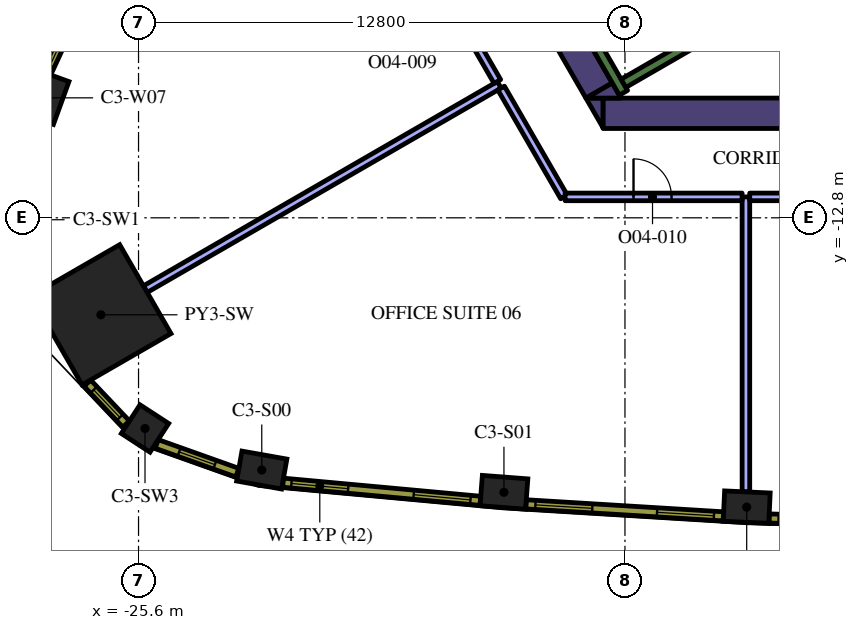
"""IFC4 building model, lengths in metres.
Left out: names, types, materials, properties, quantities, classifications, styles, units other than length and angle.
Written with IfcOpenShell. Run it as: python <this file> out.ifc"""

import sys

from ifc_helpers import new_model, si_unit, direction, frame, frame_2d, origin, origin_2d, place, context, subcontext, project, spatial, polyline, rectangle, outline, extrude, element, fill, save


model = new_model("IFC4")
c1 = context("Model", 3, precision=1e-05, world=origin(), true_north=direction((0.0, 1.0)))
c2 = subcontext(c1, "Body", "Model", "MODEL_VIEW")
j1 = project(units=[si_unit("LENGTHUNIT", "METRE"), si_unit("PLANEANGLEUNIT", "RADIAN")], contexts=[c1])
p1 = place(None, origin())
s1 = spatial("IfcSite", under=j1, at=p1, CompositionType="ELEMENT")
p2 = place(p1, origin())
s2 = spatial("IfcBuilding", under=s1, at=p2, CompositionType="ELEMENT")
p3 = place(p2, frame((0.0, 0.0, 187.8)))
s3 = spatial("IfcBuildingStorey", under=s2, at=p3, CompositionType="ELEMENT", Elevation=187.8)
p4 = place(p3, frame((-26.591, -15.352, 0.0), z_axis=(0.0, 0.0, 1.0), x_axis=(-0.866025403784, -0.5, 0.0)))
e1 = element("IfcColumn", 1, at=p4, inside=s3, PredefinedType="COLUMN", context=c2, shape_type="SweptSolid", body=[
    extrude(rectangle(XDim=2.7, YDim=2.7, at=origin_2d()), origin(), (0.0, 0.0, 1.0), 4.2),
])
for number, where, z_axis, x_axis in (
    (2, (-22.357, -19.437, 0.0), (0.0, 0.0, 1.0), (0.985, -0.175, 0.0)),
    (3, (-15.985, -20.022, 0.0), (0.0, 0.0, 1.0), (0.997, -0.076, 0.0)),
    (4, (-9.597, -20.413, 0.0), (0.0, 0.0, 1.0), (0.999, -0.046, 0.0)),
    (5, (-28.012, -9.644, 0.0), (0.0, 0.0, 1.0), (-0.341, -0.94, 0.0)),
):
    element("IfcColumn", number, at=place(p3, frame(where, z_axis=z_axis, x_axis=x_axis)), inside=s3, PredefinedType="COLUMN", context=c2, shape_type="SweptSolid", body=[
        extrude(rectangle(XDim=1.2, YDim=0.8, at=origin_2d()), origin(), (0.0, 0.0, 1.0), 4.2),
    ])
p5 = place(p3, frame((-25.43, -18.344, 0.0), z_axis=(0.0, 0.0, 1.0), x_axis=(0.838094050847, -0.545525766518, 0.0)))
e6 = element("IfcColumn", 6, at=p5, inside=s3, PredefinedType="COLUMN", context=c2, shape_type="SweptSolid", body=[
    extrude(rectangle(XDim=0.9, YDim=0.9, at=origin_2d()), origin(), (0.0, 0.0, 1.0), 4.2),
])
p6 = place(p3, frame((-13.378, -10.05, 0.0), z_axis=(0.0, 0.0, 1.0), x_axis=(1.0, 0.0, 0.0)))
e7 = element("IfcWall", 7, at=p6, inside=s3, PredefinedType="SOLIDWALL", context=c2, shape_type="SweptSolid", body=[
    extrude(rectangle(XDim=22.282, YDim=0.8, at=frame_2d((11.141, 0.0))), origin(), (0.0, 0.0, 1.0), 4.2),
])
p7 = place(p3, origin())
e8 = element("IfcWall", 8, at=p7, inside=s3, PredefinedType="SOLIDWALL", context=c2, shape_type="SweptSolid", body=[
    extrude(outline(polyline([(-13.828, -9.65), (-13.38, -9.65), (-13.38, -10.426), (-13.828, -9.65)])), origin(), (0.0, 0.0, 1.0), 4.2),
])
p8 = place(p3, frame((-15.392, -6.14, 0.0), z_axis=(0.0, 0.0, 1.0), x_axis=(0.499984020225, -0.866034629516, 0.0)))
e9 = element("IfcWall", 9, at=p8, inside=s3, PredefinedType="SOLIDWALL", context=c2, shape_type="SweptSolid", body=[
    extrude(rectangle(XDim=3.824, YDim=0.8, at=frame_2d((1.912, 0.0))), origin(), (0.0, 0.0, 1.0), 4.2),
])
e10 = element("IfcWall", 10, at=p7, inside=s3, PredefinedType="SOLIDWALL", context=c2, shape_type="SweptSolid", body=[
    extrude(outline(polyline([(-12.904, -9.65), (-13.82, -9.65), (-13.133, -9.253), (-12.904, -9.65)])), origin(), (0.0, 0.0, 1.0), 4.2),
])
p9 = place(p3, frame((-12.84, -9.511, 0.0), z_axis=(0.0, 0.0, 1.0), x_axis=(-0.499997733992, 0.866026712061, 0.0)))
e11 = element("IfcWall", 11, at=p9, inside=s3, PredefinedType="SOLIDWALL", context=c2, shape_type="SweptSolid", body=[
    extrude(rectangle(XDim=3.634, YDim=0.25, at=frame_2d((1.817, 0.0))), origin(), (0.0, 0.0, 1.0), 4.2),
])
p10 = place(p3, frame((-12.84, -9.261, 0.0), z_axis=(0.0, 0.0, 1.0), x_axis=(0.866016039709, 0.500016218704, 0.0)))
e12 = element("IfcWall", 12, at=p10, inside=s3, PredefinedType="SOLIDWALL", context=c2, shape_type="SweptSolid", body=[
    extrude(rectangle(XDim=7.05, YDim=0.25, at=frame_2d((3.525, 0.0))), origin(), (0.0, 0.0, 1.0), 4.2),
])
p11 = place(p3, frame((-9.617, -20.011, 0.0), z_axis=(0.0, 0.0, 1.0), x_axis=(0.0, 1.0, 0.0)))
e13 = element("IfcWall", 13, at=p11, inside=s3, PredefinedType="PARTITIONING", context=c2, shape_type="SweptSolid", body=[
    extrude(rectangle(XDim=7.761, YDim=0.2, at=frame_2d((3.881, 0.0))), origin(), (0.0, 0.0, 1.0), 3.15),
])
p12 = place(p3, frame((-9.517, -12.25, 0.0), z_axis=(0.0, 0.0, 1.0), x_axis=(1.0, 0.0, 0.0)))
e14 = element("IfcWall", 14, at=p12, inside=s3, PredefinedType="PARTITIONING", context=c2, shape_type="SweptSolid", body=[
    extrude(rectangle(XDim=5.987, YDim=0.2, at=frame_2d((2.994, 0.0))), origin(), (0.0, 0.0, 1.0), 3.15),
])
p13 = place(p3, frame((-16.108, -9.3, 0.0), z_axis=(0.0, 0.0, 1.0), x_axis=(-0.866027180319, -0.499996922939, 0.0)))
e15 = element("IfcWall", 15, at=p13, inside=s3, PredefinedType="PARTITIONING", context=c2, shape_type="SweptSolid", body=[
    extrude(rectangle(XDim=10.754, YDim=0.2, at=frame_2d((5.377, 0.0))), origin(), (0.0, 0.0, 1.0), 3.15),
])
p14 = place(p3, frame((-17.796, -6.376, 0.0), z_axis=(0.0, 0.0, 1.0), x_axis=(0.500001965626, -0.866024268927, 0.0)))
e16 = element("IfcWall", 16, at=p14, inside=s3, PredefinedType="PARTITIONING", context=c2, shape_type="SweptSolid", body=[
    extrude(rectangle(XDim=3.276, YDim=0.2, at=frame_2d((1.638, 0.0))), origin(), (0.0, 0.0, 1.0), 3.15),
])
p15 = place(p14, frame((1.1, 0.0, 0.0)))
e17 = element("IfcOpeningElement", 17, at=p15, cuts=e16, PredefinedType="OPENING", context=c2, shape_type="SweptSolid", body=[
    extrude(rectangle(XDim=1.0, YDim=2.1, at=frame_2d((0.5, 1.05))), frame((0.0, 0.11, 0.0), z_axis=(0.0, -1.0, 0.0), x_axis=(1.0, 0.0, 0.0)), (0.0, 0.0, 1.0), 0.22),
])
p16 = place(p3, frame((-16.058, -9.387, 0.0), z_axis=(0.0, 0.0, 1.0), x_axis=(0.500046299512, -0.865998671098, 0.0)))
e18 = element("IfcWall", 18, at=p16, inside=s3, PredefinedType="PARTITIONING", context=c2, shape_type="SweptSolid", body=[
    extrude(rectangle(XDim=3.306, YDim=0.2, at=frame_2d((1.653, 0.0))), origin(), (0.0, 0.0, 1.0), 3.15),
])
p17 = place(p3, frame((-14.375, -12.25, 0.0), z_axis=(0.0, 0.0, 1.0), x_axis=(1.0, 0.0, 0.0)))
e19 = element("IfcWall", 19, at=p17, inside=s3, PredefinedType="PARTITIONING", context=c2, shape_type="SweptSolid", body=[
    extrude(rectangle(XDim=4.658, YDim=0.2, at=frame_2d((2.329, 0.0))), origin(), (0.0, 0.0, 1.0), 3.15),
])
p18 = place(p17, frame((1.8, 0.0, 0.0)))
e20 = element("IfcOpeningElement", 20, at=p18, cuts=e19, PredefinedType="OPENING", context=c2, shape_type="SweptSolid", body=[
    extrude(rectangle(XDim=1.0, YDim=2.1, at=frame_2d((0.5, 1.05))), frame((0.0, 0.11, 0.0), z_axis=(0.0, -1.0, 0.0), x_axis=(1.0, 0.0, 0.0)), (0.0, 0.0, 1.0), 0.22),
])
p19 = place(p3, frame((-21.797, -19.77, 0.0), z_axis=(0.0, 0.0, 1.0), x_axis=(0.995808712151, -0.091460422067, 0.0)))
e21 = element("IfcWall", 21, at=p19, inside=s3, PredefinedType="SOLIDWALL", context=c2, shape_type="SweptSolid", body=[
    extrude(rectangle(XDim=5.213, YDim=0.24, at=frame_2d((2.606, 0.0))), origin(), (0.0, 0.0, 1.0), 3.95),
])
p20 = place(p19, frame((0.221, 0.0, 0.9)))
e22 = element("IfcOpeningElement", 22, at=p20, cuts=e21, PredefinedType="OPENING", context=c2, shape_type="SweptSolid", body=[
    extrude(rectangle(XDim=1.5, YDim=2.55, at=frame_2d((0.75, 1.275))), frame((0.0, 0.13, 0.0), z_axis=(0.0, -1.0, 0.0), x_axis=(1.0, 0.0, 0.0)), (0.0, 0.0, 1.0), 0.26),
])
p21 = place(p19, frame((3.452, 0.0, 0.9)))
e23 = element("IfcOpeningElement", 23, at=p21, cuts=e21, PredefinedType="OPENING", context=c2, shape_type="SweptSolid", body=[
    extrude(rectangle(XDim=1.5, YDim=2.55, at=frame_2d((0.75, 1.275))), frame((0.0, 0.13, 0.0), z_axis=(0.0, -1.0, 0.0), x_axis=(1.0, 0.0, 0.0)), (0.0, 0.0, 1.0), 0.26),
])
p22 = place(p3, frame((-15.405, -20.338, 0.0), z_axis=(0.0, 0.0, 1.0), x_axis=(0.998135294646, -0.061040425794, 0.0)))
e24 = element("IfcWall", 24, at=p22, inside=s3, PredefinedType="SOLIDWALL", context=c2, shape_type="SweptSolid", body=[
    extrude(rectangle(XDim=5.204, YDim=0.24, at=frame_2d((2.602, 0.0))), origin(), (0.0, 0.0, 1.0), 3.95),
])
p23 = place(p22, frame((0.248, 0.0, 0.9)))
e25 = element("IfcOpeningElement", 25, at=p23, cuts=e24, PredefinedType="OPENING", context=c2, shape_type="SweptSolid", body=[
    extrude(rectangle(XDim=1.5, YDim=2.55, at=frame_2d((0.75, 1.275))), frame((0.0, 0.13, 0.0), z_axis=(0.0, -1.0, 0.0), x_axis=(1.0, 0.0, 0.0)), (0.0, 0.0, 1.0), 0.26),
])
p24 = place(p22, frame((3.455, 0.0, 0.9)))
e26 = element("IfcOpeningElement", 26, at=p24, cuts=e24, PredefinedType="OPENING", context=c2, shape_type="SweptSolid", body=[
    extrude(rectangle(XDim=1.5, YDim=2.55, at=frame_2d((0.75, 1.275))), frame((0.0, 0.13, 0.0), z_axis=(0.0, -1.0, 0.0), x_axis=(1.0, 0.0, 0.0)), (0.0, 0.0, 1.0), 0.26),
])
p25 = place(p3, frame((-9.007, -20.711, 0.0), z_axis=(0.0, 0.0, 1.0), x_axis=(0.999533441983, -0.030543384845, 0.0)))
e27 = element("IfcWall", 27, at=p25, inside=s3, PredefinedType="SOLIDWALL", context=c2, shape_type="SweptSolid", body=[
    extrude(rectangle(XDim=5.204, YDim=0.24, at=frame_2d((2.602, 0.0))), origin(), (0.0, 0.0, 1.0), 3.95),
])
p26 = place(p25, frame((0.248, 0.0, 0.9)))
e28 = element("IfcOpeningElement", 28, at=p26, cuts=e27, PredefinedType="OPENING", context=c2, shape_type="SweptSolid", body=[
    extrude(rectangle(XDim=1.5, YDim=2.55, at=frame_2d((0.75, 1.275))), frame((0.0, 0.13, 0.0), z_axis=(0.0, -1.0, 0.0), x_axis=(1.0, 0.0, 0.0)), (0.0, 0.0, 1.0), 0.26),
])
p27 = place(p25, frame((3.455, 0.0, 0.9)))
e29 = element("IfcOpeningElement", 29, at=p27, cuts=e27, PredefinedType="OPENING", context=c2, shape_type="SweptSolid", body=[
    extrude(rectangle(XDim=1.5, YDim=2.55, at=frame_2d((0.75, 1.275))), frame((0.0, 0.13, 0.0), z_axis=(0.0, -1.0, 0.0), x_axis=(1.0, 0.0, 0.0)), (0.0, 0.0, 1.0), 0.26),
])
p28 = place(p3, frame((-25.837, -4.258, 0.0), z_axis=(0.0, 0.0, 1.0), x_axis=(-0.418722559465, -0.908114209885, 0.0)))
e30 = element("IfcWall", 30, at=p28, inside=s3, PredefinedType="SOLIDWALL", context=c2, shape_type="SweptSolid", body=[
    extrude(rectangle(XDim=5.213, YDim=0.24, at=frame_2d((2.606, 0.0))), origin(), (0.0, 0.0, 1.0), 3.95),
])
p29 = place(p28, frame((0.261, 0.0, 0.9)))
e31 = element("IfcOpeningElement", 31, at=p29, cuts=e30, PredefinedType="OPENING", context=c2, shape_type="SweptSolid", body=[
    extrude(rectangle(XDim=1.5, YDim=2.55, at=frame_2d((0.75, 1.275))), frame((0.0, 0.13, 0.0), z_axis=(0.0, -1.0, 0.0), x_axis=(1.0, 0.0, 0.0)), (0.0, 0.0, 1.0), 0.26),
])
p30 = place(p28, frame((3.492, 0.0, 0.9)))
e32 = element("IfcOpeningElement", 32, at=p30, cuts=e30, PredefinedType="OPENING", context=c2, shape_type="SweptSolid", body=[
    extrude(rectangle(XDim=1.5, YDim=2.55, at=frame_2d((0.75, 1.275))), frame((0.0, 0.13, 0.0), z_axis=(0.0, -1.0, 0.0), x_axis=(1.0, 0.0, 0.0)), (0.0, 0.0, 1.0), 0.26),
])
p31 = place(p3, frame((-26.946, -17.151, 0.0), z_axis=(0.0, 0.0, 1.0), x_axis=(0.687986858937, -0.725723144133, 0.0)))
e33 = element("IfcWall", 33, at=p31, inside=s3, PredefinedType="SOLIDWALL", context=c2, shape_type="SweptSolid", body=[
    extrude(rectangle(XDim=1.481, YDim=0.24, at=frame_2d((0.741, 0.0))), origin(), (0.0, 0.0, 1.0), 3.95),
])
p32 = place(p31, frame((0.241, 0.0, 0.9)))
e34 = element("IfcOpeningElement", 34, at=p32, cuts=e33, PredefinedType="OPENING", context=c2, shape_type="SweptSolid", body=[
    extrude(rectangle(XDim=1.0, YDim=2.55, at=frame_2d((0.5, 1.275))), frame((0.0, 0.13, 0.0), z_axis=(0.0, -1.0, 0.0), x_axis=(1.0, 0.0, 0.0)), (0.0, 0.0, 1.0), 0.26),
])
p33 = place(p3, frame((-25.121, -18.751, 0.0), z_axis=(0.0, 0.0, 1.0), x_axis=(0.942099727267, -0.335332825539, 0.0)))
e35 = element("IfcWall", 35, at=p33, inside=s3, PredefinedType="SOLIDWALL", context=c2, shape_type="SweptSolid", body=[
    extrude(rectangle(XDim=2.25, YDim=0.24, at=frame_2d((1.125, 0.0))), origin(), (0.0, 0.0, 1.0), 3.95),
])
p34 = place(p33, frame((0.625, 0.0, 0.9)))
e36 = element("IfcOpeningElement", 36, at=p34, cuts=e35, PredefinedType="OPENING", context=c2, shape_type="SweptSolid", body=[
    extrude(rectangle(XDim=1.0, YDim=2.55, at=frame_2d((0.5, 1.275))), frame((0.0, 0.13, 0.0), z_axis=(0.0, -1.0, 0.0), x_axis=(1.0, 0.0, 0.0)), (0.0, 0.0, 1.0), 0.26),
])
p35 = place(p18, origin())
e37 = element("IfcDoor", 37, at=p35, inside=s3, OperationType="SINGLE_SWING_LEFT", PredefinedType="DOOR", context=c2, shape_type="SweptSolid", body=[
    extrude(rectangle(XDim=1.0, YDim=2.1, at=frame_2d((0.5, 1.05))), frame((0.0, 0.025, 0.0), z_axis=(0.0, -1.0, 0.0), x_axis=(1.0, 0.0, 0.0)), (0.0, 0.0, 1.0), 0.05),
])
fill(e20, e37)
p36 = place(p20, origin())
e38 = element("IfcWindow", 38, at=p36, inside=s3, PartitioningType="SINGLE_PANEL", PredefinedType="WINDOW", context=c2, shape_type="SweptSolid", body=[
    extrude(rectangle(XDim=1.5, YDim=2.55, at=frame_2d((0.75, 1.275))), frame((0.0, 0.04, 0.0), z_axis=(0.0, -1.0, 0.0), x_axis=(1.0, 0.0, 0.0)), (0.0, 0.0, 1.0), 0.06),
])
fill(e22, e38)
p37 = place(p21, origin())
e39 = element("IfcWindow", 39, at=p37, inside=s3, PartitioningType="SINGLE_PANEL", PredefinedType="WINDOW", context=c2, shape_type="SweptSolid", body=[
    extrude(rectangle(XDim=1.5, YDim=2.55, at=frame_2d((0.75, 1.275))), frame((0.0, 0.04, 0.0), z_axis=(0.0, -1.0, 0.0), x_axis=(1.0, 0.0, 0.0)), (0.0, 0.0, 1.0), 0.06),
])
fill(e23, e39)
p38 = place(p23, origin())
e40 = element("IfcWindow", 40, at=p38, inside=s3, PartitioningType="SINGLE_PANEL", PredefinedType="WINDOW", context=c2, shape_type="SweptSolid", body=[
    extrude(rectangle(XDim=1.5, YDim=2.55, at=frame_2d((0.75, 1.275))), frame((0.0, 0.04, 0.0), z_axis=(0.0, -1.0, 0.0), x_axis=(1.0, 0.0, 0.0)), (0.0, 0.0, 1.0), 0.06),
])
fill(e25, e40)
p39 = place(p24, origin())
e41 = element("IfcWindow", 41, at=p39, inside=s3, PartitioningType="SINGLE_PANEL", PredefinedType="WINDOW", context=c2, shape_type="SweptSolid", body=[
    extrude(rectangle(XDim=1.5, YDim=2.55, at=frame_2d((0.75, 1.275))), frame((0.0, 0.04, 0.0), z_axis=(0.0, -1.0, 0.0), x_axis=(1.0, 0.0, 0.0)), (0.0, 0.0, 1.0), 0.06),
])
fill(e26, e41)
p40 = place(p26, origin())
e42 = element("IfcWindow", 42, at=p40, inside=s3, PartitioningType="SINGLE_PANEL", PredefinedType="WINDOW", context=c2, shape_type="SweptSolid", body=[
    extrude(rectangle(XDim=1.5, YDim=2.55, at=frame_2d((0.75, 1.275))), frame((0.0, 0.04, 0.0), z_axis=(0.0, -1.0, 0.0), x_axis=(1.0, 0.0, 0.0)), (0.0, 0.0, 1.0), 0.06),
])
fill(e28, e42)
p41 = place(p30, origin())
e43 = element("IfcWindow", 43, at=p41, inside=s3, PartitioningType="SINGLE_PANEL", PredefinedType="WINDOW", context=c2, shape_type="SweptSolid", body=[
    extrude(rectangle(XDim=1.5, YDim=2.55, at=frame_2d((0.75, 1.275))), frame((0.0, 0.04, 0.0), z_axis=(0.0, -1.0, 0.0), x_axis=(1.0, 0.0, 0.0)), (0.0, 0.0, 1.0), 0.06),
])
fill(e32, e43)
p42 = place(p32, origin())
e44 = element("IfcWindow", 44, at=p42, inside=s3, PartitioningType="SINGLE_PANEL", PredefinedType="WINDOW", context=c2, shape_type="SweptSolid", body=[
    extrude(rectangle(XDim=1.0, YDim=2.55, at=frame_2d((0.5, 1.275))), frame((0.0, 0.04, 0.0), z_axis=(0.0, -1.0, 0.0), x_axis=(1.0, 0.0, 0.0)), (0.0, 0.0, 1.0), 0.06),
])
fill(e34, e44)
p43 = place(p34, origin())
e45 = element("IfcWindow", 45, at=p43, inside=s3, PartitioningType="SINGLE_PANEL", PredefinedType="WINDOW", context=c2, shape_type="SweptSolid", body=[
    extrude(rectangle(XDim=1.0, YDim=2.55, at=frame_2d((0.5, 1.275))), frame((0.0, 0.04, 0.0), z_axis=(0.0, -1.0, 0.0), x_axis=(1.0, 0.0, 0.0)), (0.0, 0.0, 1.0), 0.06),
])
fill(e36, e45)
save(model, sys.argv[1])
